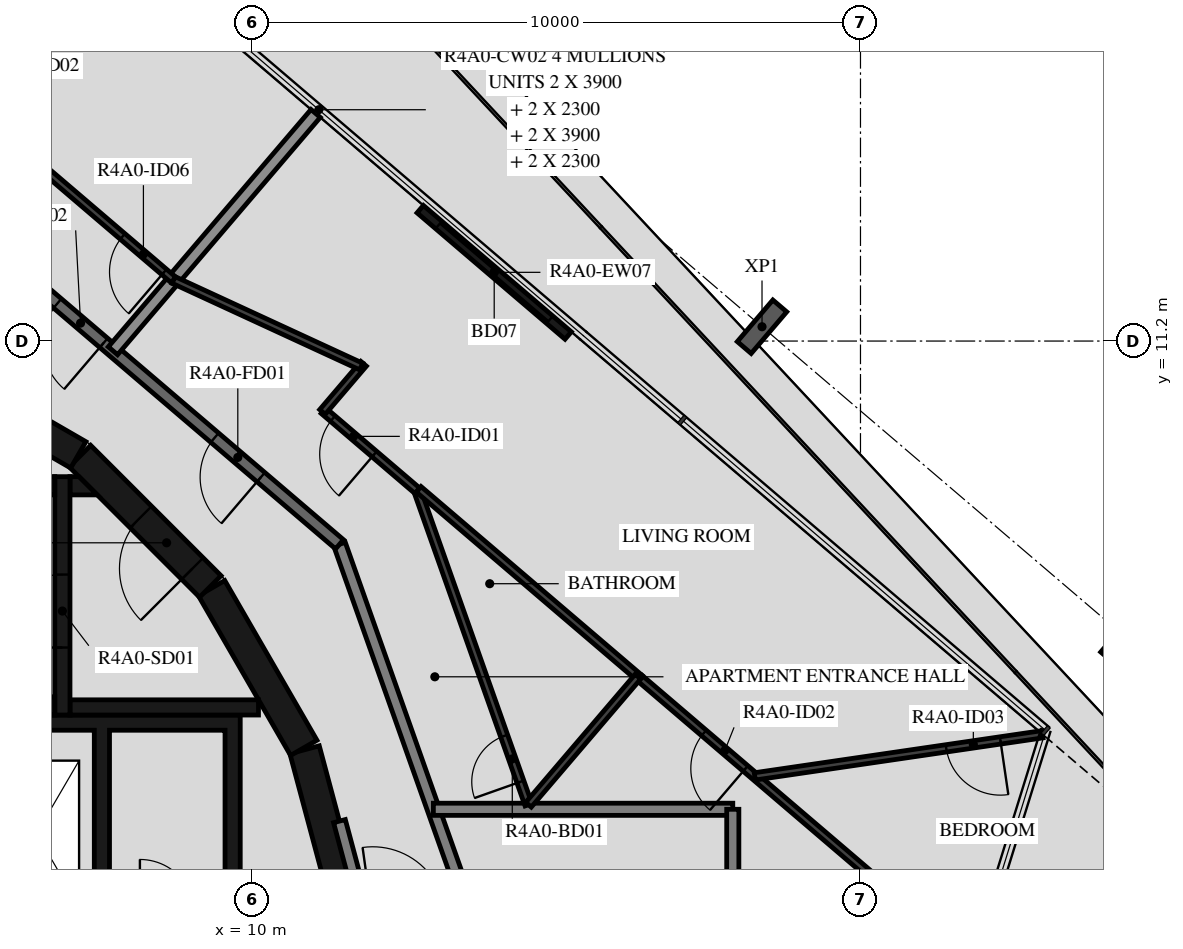
"""IFC4 building model, lengths in metres.
Left out: names, types, materials, properties, quantities, classifications, styles, units other than length and angle.
Written with IfcOpenShell. Run it as: python <this file> out.ifc"""

import sys

from ifc_helpers import new_model, si_unit, direction, frame, frame_2d, origin, origin_2d, place, context, subcontext, project, spatial, polyline, rectangle, i_section, outline, extrude, element, fill, save


model = new_model("IFC4")
c1 = context("Model", 3, precision=1e-05, world=origin(), true_north=direction((0.0, 1.0)))
c2 = subcontext(c1, "Body", "Model", "MODEL_VIEW")
j1 = project(units=[si_unit("LENGTHUNIT", "METRE"), si_unit("PLANEANGLEUNIT", "RADIAN")], contexts=[c1])
p1 = place(None, origin())
s1 = spatial("IfcSite", under=j1, at=p1, CompositionType="ELEMENT")
p2 = place(p1, origin())
s2 = spatial("IfcBuilding", under=s1, at=p2, CompositionType="ELEMENT")
p3 = place(p2, frame((0.0, 0.0, 151.7)))
s3 = spatial("IfcBuildingStorey", under=s2, at=p3, CompositionType="ELEMENT", Elevation=151.7)
for number, where, z_axis, x_axis in (
    (1, (24.358, 6.331, -0.45), (0.0, 0.0, 1.0), (0.76, -0.649, 0.0)),
    (2, (18.381, 11.436, -0.45), (0.0, 0.0, 1.0), (0.76, -0.649, 0.0)),
):
    element("IfcColumn", number, at=place(p3, frame(where, z_axis=z_axis, x_axis=x_axis)), inside=s3, PredefinedType="COLUMN", context=c2, shape_type="SweptSolid", body=[
        extrude(i_section(OverallWidth=0.3, OverallDepth=0.9, WebThickness=0.019, FlangeThickness=0.035, FilletRadius=0.03, at=origin_2d()), origin(), (0.0, 0.0, 1.0), 3.57),
    ])
p4 = place(p3, frame((15.193, 11.291, 0.0), z_axis=(0.0, 0.0, 1.0), x_axis=(-0.760391731187, 0.649464714317, 0.0)))
e3 = element("IfcWall", 3, at=p4, inside=s3, PredefinedType="STANDARD", context=c2, shape_type="SweptSolid", body=[
    extrude(rectangle(XDim=3.2, YDim=0.16, at=frame_2d((1.6, 0.0))), origin(), (0.0, 0.0, 1.0), 3.12),
])
p5 = place(p4, frame((0.4, 0.0, 0.0)))
e4 = element("IfcOpeningElement", 4, at=p5, cuts=e3, PredefinedType="OPENING", context=c2, shape_type="SweptSolid", body=[
    extrude(rectangle(XDim=2.4, YDim=2.4, at=frame_2d((1.2, 1.2))), frame((0.0, 0.09, 0.0), z_axis=(0.0, -1.0, 0.0), x_axis=(1.0, 0.0, 0.0)), (0.0, 0.0, 1.0), 0.18),
])
for number, where, z_axis, x_axis in (
    (5, (11.643, 1.55, 0.0), (0.0, 0.0, 1.0), (-0.259, 0.966, 0.0)),
    (6, (10.845, 4.51, 0.0), (0.0, 0.0, 1.0), (-0.5, 0.866, 0.0)),
):
    element("IfcWall", number, at=place(p3, frame(where, z_axis=z_axis, x_axis=x_axis)), inside=s3, PredefinedType="SHEAR", context=c2, shape_type="SweptSolid", body=[
        extrude(rectangle(XDim=3.033, YDim=0.5, at=frame_2d((1.516, 0.0))), origin(), (0.0, 0.0, 1.0), 3.12),
    ])
p6 = place(p3, frame((9.308, 7.164, 0.0), z_axis=(0.0, 0.0, 1.0), x_axis=(-0.707106781187, 0.707106781187, 0.0)))
e7 = element("IfcWall", 7, at=p6, inside=s3, PredefinedType="SHEAR", context=c2, shape_type="SweptSolid", body=[
    extrude(rectangle(XDim=3.032, YDim=0.5, at=frame_2d((1.516, 0.0))), origin(), (0.0, 0.0, 1.0), 3.12),
])
p7 = place(p6, frame((0.416, 0.0, 0.0)))
e8 = element("IfcOpeningElement", 8, at=p7, cuts=e7, PredefinedType="OPENING", context=c2, shape_type="SweptSolid", body=[
    extrude(rectangle(XDim=1.2, YDim=2.1, at=frame_2d((0.6, 1.05))), frame((0.0, 0.26, 0.0), z_axis=(0.0, -1.0, 0.0), x_axis=(1.0, 0.0, 0.0)), (0.0, 0.0, 1.0), 0.52),
])
p8 = place(p3, frame((7.137, 9.329, 0.0), z_axis=(0.0, 0.0, 1.0), x_axis=(-0.865975092491, 0.500087131594, 0.0)))
e9 = element("IfcWall", 9, at=p8, inside=s3, PredefinedType="SHEAR", context=c2, shape_type="SweptSolid", body=[
    extrude(rectangle(XDim=3.033, YDim=0.5, at=frame_2d((1.516, 0.0))), origin(), (0.0, 0.0, 1.0), 3.12),
])
for number, where, z_axis, x_axis in (
    (10, (0.0, 5.2, 0.0), (0.0, 0.0, 1.0), (1.0, 0.0, 0.0)),
    (11, (0.0, 8.82, 0.0), (0.0, 0.0, 1.0), (1.0, 0.0, 0.0)),
):
    element("IfcWall", number, at=place(p3, frame(where, z_axis=z_axis, x_axis=x_axis)), inside=s3, PredefinedType="SHEAR", context=c2, shape_type="SweptSolid", body=[
        extrude(rectangle(XDim=6.75, YDim=0.3, at=frame_2d((3.375, 0.0))), origin(), (0.0, 0.0, 1.0), 3.12),
    ])
p9 = place(p3, frame((6.875, 5.05, 0.0), z_axis=(0.0, 0.0, 1.0), x_axis=(0.0, 1.0, 0.0)))
e12 = element("IfcWall", 12, at=p9, inside=s3, PredefinedType="SHEAR", context=c2, shape_type="SweptSolid", body=[
    extrude(rectangle(XDim=3.92, YDim=0.25, at=frame_2d((1.96, 0.0))), origin(), (0.0, 0.0, 1.0), 3.12),
])
p10 = place(p9, frame((1.11, 0.0, 0.0)))
e13 = element("IfcOpeningElement", 13, at=p10, cuts=e12, PredefinedType="OPENING", context=c2, shape_type="SweptSolid", body=[
    extrude(rectangle(XDim=1.2, YDim=2.1, at=frame_2d((0.6, 1.05))), frame((0.0, 0.135, 0.0), z_axis=(0.0, -1.0, 0.0), x_axis=(1.0, 0.0, 0.0)), (0.0, 0.0, 1.0), 0.27),
])
p11 = place(p3, frame((7.0, 5.175, 0.0), z_axis=(0.0, 0.0, 1.0), x_axis=(1.0, 0.0, 0.0)))
e14 = element("IfcWall", 14, at=p11, inside=s3, PredefinedType="SHEAR", context=c2, shape_type="SweptSolid", body=[
    extrude(rectangle(XDim=3.1, YDim=0.25, at=frame_2d((1.55, 0.0))), origin(), (0.0, 0.0, 1.0), 3.12),
])
p12 = place(p3, origin())
e15 = element("IfcWall", 15, at=p12, inside=s3, PredefinedType="SHEAR", context=c2, shape_type="SweptSolid", body=[
    extrude(outline(polyline([(7.448, 8.67), (7.0, 8.67), (7.0, 8.97), (7.148, 8.97), (7.448, 8.67)])), origin(), (0.0, 0.0, 1.0), 3.12),
])
p13 = place(p3, origin())
e16 = element("IfcWall", 16, at=p13, inside=s3, PredefinedType="SHEAR", context=c2, shape_type="SweptSolid", body=[
    extrude(outline(polyline([(-9.55, 4.8), (-1.2, 4.8), (-1.2, 1.9), (-0.95, 1.9), (-0.95, 4.8), (0.95, 4.8), (0.95, 1.9), (1.2, 1.9), (1.2, 4.8), (3.1, 4.8), (3.1, 1.9), (3.35, 1.9), (3.35, 4.8), (5.25, 4.8), (5.25, 1.9), (5.5, 1.9), (5.5, 4.8), (7.4, 4.8), (7.4, 1.9), (7.65, 1.9), (7.65, 4.8), (9.55, 4.8), (9.55, 1.9), (9.8, 1.9), (9.8, 4.8), (9.8, 5.05), (-9.8, 5.05), (-9.8, 4.8), (-9.8, 1.9), (-9.55, 1.9), (-9.55, 4.8)])), origin(), (0.0, 0.0, 1.0), 3.12),
])
p14 = place(p3, frame((11.87, 1.668, 0.0), z_axis=(0.0, 0.0, 1.0), x_axis=(-0.258836880648, 0.965921047093, 0.0)))
e17 = element("IfcWall", 17, at=p14, inside=s3, PredefinedType="STANDARD", context=c2, shape_type="SweptSolid", body=[
    extrude(rectangle(XDim=1.695, YDim=0.2, at=frame_2d((0.848, 0.0))), origin(), (0.0, 0.0, 1.0), 3.12),
])
p15 = place(p3, frame((13.542, 1.903, 0.0), z_axis=(0.0, 0.0, 1.0), x_axis=(-0.333808508206, 0.942640907159, 0.0)))
e18 = element("IfcWall", 18, at=p15, inside=s3, PredefinedType="STANDARD", context=c2, shape_type="SweptSolid", body=[
    extrude(rectangle(XDim=6.317, YDim=0.2, at=frame_2d((3.158, 0.0))), origin(), (0.0, 0.0, 1.0), 3.12),
])
p16 = place(p3, frame((11.433, 7.858, 0.0), z_axis=(0.0, 0.0, 1.0), x_axis=(-0.760412154545, 0.649440801937, 0.0)))
e19 = element("IfcWall", 19, at=p16, inside=s3, PredefinedType="STANDARD", context=c2, shape_type="SweptSolid", body=[
    extrude(rectangle(XDim=7.181, YDim=0.2, at=frame_2d((3.59, 0.0))), origin(), (0.0, 0.0, 1.0), 3.12),
])
p17 = place(p16, frame((1.7, 0.0, 0.0)))
e20 = element("IfcOpeningElement", 20, at=p17, cuts=e19, PredefinedType="OPENING", context=c2, shape_type="SweptSolid", body=[
    extrude(rectangle(XDim=1.0, YDim=2.1, at=frame_2d((0.5, 1.05))), frame((0.0, 0.11, 0.0), z_axis=(0.0, -1.0, 0.0), x_axis=(1.0, 0.0, 0.0)), (0.0, 0.0, 1.0), 0.22),
])
p18 = place(p16, frame((5.101, 0.0, 0.0)))
e21 = element("IfcOpeningElement", 21, at=p18, cuts=e19, PredefinedType="OPENING", context=c2, shape_type="SweptSolid", body=[
    extrude(rectangle(XDim=1.0, YDim=2.1, at=frame_2d((0.5, 1.05))), frame((0.0, 0.11, 0.0), z_axis=(0.0, -1.0, 0.0), x_axis=(1.0, 0.0, 0.0)), (0.0, 0.0, 1.0), 0.22),
])
p19 = place(p3, frame((17.9, 3.5, 0.0), z_axis=(0.0, 0.0, 1.0), x_axis=(-1.0, 0.0, 0.0)))
e22 = element("IfcWall", 22, at=p19, inside=s3, PredefinedType="STANDARD", context=c2, shape_type="SweptSolid", body=[
    extrude(rectangle(XDim=4.924, YDim=0.2, at=frame_2d((2.462, 0.0))), origin(), (0.0, 0.0, 1.0), 3.12),
])
p20 = place(p3, frame((17.9, -3.318, 0.0), z_axis=(0.0, 0.0, 1.0), x_axis=(0.0, 1.0, 0.0)))
e23 = element("IfcWall", 23, at=p20, inside=s3, PredefinedType="STANDARD", context=c2, shape_type="SweptSolid", body=[
    extrude(rectangle(XDim=6.818, YDim=0.2, at=frame_2d((3.409, 0.0))), origin(), (0.0, 0.0, 1.0), 3.12),
])
p21 = place(p3, frame((11.04, 14.943, 0.0), z_axis=(0.0, 0.0, 1.0), x_axis=(-0.649442880087, -0.760410379666, 0.0)))
e24 = element("IfcWall", 24, at=p21, inside=s3, PredefinedType="STANDARD", context=c2, shape_type="SweptSolid", body=[
    extrude(rectangle(XDim=5.133, YDim=0.2, at=frame_2d((2.566, 0.0))), origin(), (0.0, 0.0, 1.0), 2.73),
])
p22 = place(p3, frame((14.541, 3.575, 0.0), z_axis=(0.0, 0.0, 1.0), x_axis=(-0.333799280318, 0.942644174893, 0.0)))
e25 = element("IfcWall", 25, at=p22, inside=s3, PredefinedType="PARTITIONING", context=c2, shape_type="SweptSolid", body=[
    extrude(rectangle(XDim=5.477, YDim=0.12, at=frame_2d((2.738, 0.0))), origin(), (0.0, 0.0, 1.0), 3.12),
])
p23 = place(p22, frame((0.4, 0.0, 0.0)))
e26 = element("IfcOpeningElement", 26, at=p23, cuts=e25, PredefinedType="OPENING", context=c2, shape_type="SweptSolid", body=[
    extrude(rectangle(XDim=0.8, YDim=2.1, at=frame_2d((0.4, 1.05))), frame((0.0, 0.07, 0.0), z_axis=(0.0, -1.0, 0.0), x_axis=(1.0, 0.0, 0.0)), (0.0, 0.0, 1.0), 0.14),
])
p24 = place(p3, frame((12.713, 8.737, 0.0), z_axis=(0.0, 0.0, 1.0), x_axis=(-0.760410825807, 0.649442357716, 0.0)))
e27 = element("IfcWall", 27, at=p24, inside=s3, PredefinedType="PARTITIONING", context=c2, shape_type="SweptSolid", body=[
    extrude(rectangle(XDim=2.029, YDim=0.12, at=frame_2d((1.014, 0.0))), origin(), (0.0, 0.0, 1.0), 3.12),
])
p25 = place(p24, frame((0.929, 0.0, 0.0)))
e28 = element("IfcOpeningElement", 28, at=p25, cuts=e27, PredefinedType="OPENING", context=c2, shape_type="SweptSolid", body=[
    extrude(rectangle(XDim=0.9, YDim=2.1, at=frame_2d((0.45, 1.05))), frame((0.0, 0.07, 0.0), z_axis=(0.0, -1.0, 0.0), x_axis=(1.0, 0.0, 0.0)), (0.0, 0.0, 1.0), 0.14),
])
p26 = place(p3, frame((12.734, 8.762, 0.0), z_axis=(0.0, 0.0, 1.0), x_axis=(0.760390484255, -0.649466174219, 0.0)))
e29 = element("IfcWall", 29, at=p26, inside=s3, PredefinedType="PARTITIONING", context=c2, shape_type="SweptSolid", body=[
    extrude(rectangle(XDim=4.783, YDim=0.12, at=frame_2d((2.391, 0.0))), origin(), (0.0, 0.0, 1.0), 3.12),
])
p27 = place(p3, frame((11.153, 10.034, 0.0), z_axis=(0.0, 0.0, 1.0), x_axis=(0.649381401329, 0.760462882466, 0.0)))
e30 = element("IfcWall", 30, at=p27, inside=s3, PredefinedType="PARTITIONING", context=c2, shape_type="SweptSolid", body=[
    extrude(rectangle(XDim=1.042, YDim=0.12, at=frame_2d((0.521, 0.0))), origin(), (0.0, 0.0, 1.0), 3.12),
])
p28 = place(p3, frame((11.79, 10.781, 0.0), z_axis=(0.0, 0.0, 1.0), x_axis=(-0.907999296286, 0.418971691101, 0.0)))
e31 = element("IfcWall", 31, at=p28, inside=s3, PredefinedType="PARTITIONING", context=c2, shape_type="SweptSolid", body=[
    extrude(rectangle(XDim=3.401, YDim=0.12, at=frame_2d((1.701, 0.0))), origin(), (0.0, 0.0, 1.0), 3.12),
])
p29 = place(p3, frame((23.411, -0.357, 0.0), z_axis=(0.0, 0.0, 1.0), x_axis=(-0.76041871148, 0.649433124525, 0.0)))
e32 = element("IfcWall", 32, at=p29, inside=s3, PredefinedType="PARTITIONING", context=c2, shape_type="SweptSolid", body=[
    extrude(rectangle(XDim=9.259, YDim=0.12, at=frame_2d((4.629, 0.0))), origin(), (0.0, 0.0, 1.0), 3.12),
])
p30 = place(p29, frame((6.972, 0.0, 0.0)))
e33 = element("IfcOpeningElement", 33, at=p30, cuts=e32, PredefinedType="OPENING", context=c2, shape_type="SweptSolid", body=[
    extrude(rectangle(XDim=0.9, YDim=2.1, at=frame_2d((0.45, 1.05))), frame((0.0, 0.07, 0.0), z_axis=(0.0, -1.0, 0.0), x_axis=(1.0, 0.0, 0.0)), (0.0, 0.0, 1.0), 0.14),
])
p31 = place(p29, frame((0.2, 0.0, 0.0)))
e34 = element("IfcOpeningElement", 34, at=p31, cuts=e32, PredefinedType="OPENING", context=c2, shape_type="SweptSolid", body=[
    extrude(rectangle(XDim=0.9, YDim=2.1, at=frame_2d((0.45, 1.05))), frame((0.0, 0.07, 0.0), z_axis=(0.0, -1.0, 0.0), x_axis=(1.0, 0.0, 0.0)), (0.0, 0.0, 1.0), 0.14),
])
p32 = place(p3, frame((16.341, 5.682, 0.0), z_axis=(0.0, 0.0, 1.0), x_axis=(-0.64946993237, -0.76038727432, 0.0)))
e35 = element("IfcWall", 35, at=p32, inside=s3, PredefinedType="PARTITIONING", context=c2, shape_type="SweptSolid", body=[
    extrude(rectangle(XDim=2.771, YDim=0.12, at=frame_2d((1.386, 0.0))), origin(), (0.0, 0.0, 1.0), 3.12),
])
p33 = place(p3, frame((22.994, 4.734, 0.0), z_axis=(0.0, 0.0, 1.0), x_axis=(-0.989449286977, -0.144879634529, 0.0)))
e36 = element("IfcWall", 36, at=p33, inside=s3, PredefinedType="PARTITIONING", context=c2, shape_type="SweptSolid", body=[
    extrude(rectangle(XDim=4.782, YDim=0.12, at=frame_2d((2.391, 0.0))), origin(), (0.0, 0.0, 1.0), 3.12),
])
p34 = place(p33, frame((0.7, 0.0, 0.0)))
e37 = element("IfcOpeningElement", 37, at=p34, cuts=e36, PredefinedType="OPENING", context=c2, shape_type="SweptSolid", body=[
    extrude(rectangle(XDim=0.9, YDim=2.1, at=frame_2d((0.45, 1.05))), frame((0.0, 0.07, 0.0), z_axis=(0.0, -1.0, 0.0), x_axis=(1.0, 0.0, 0.0)), (0.0, 0.0, 1.0), 0.14),
])
p35 = place(p3, frame((8.702, 12.206, 0.0), z_axis=(0.0, 0.0, 1.0), x_axis=(-0.760401313718, 0.649453494945, 0.0)))
e38 = element("IfcWall", 38, at=p35, inside=s3, PredefinedType="PARTITIONING", context=c2, shape_type="SweptSolid", body=[
    extrude(rectangle(XDim=16.724, YDim=0.12, at=frame_2d((8.362, 0.0))), origin(), (0.0, 0.0, 1.0), 3.12),
])
p36 = place(p35, frame((0.2, 0.0, 0.0)))
e39 = element("IfcOpeningElement", 39, at=p36, cuts=e38, PredefinedType="OPENING", context=c2, shape_type="SweptSolid", body=[
    extrude(rectangle(XDim=0.9, YDim=2.1, at=frame_2d((0.45, 1.05))), frame((0.0, 0.07, 0.0), z_axis=(0.0, -1.0, 0.0), x_axis=(1.0, 0.0, 0.0)), (0.0, 0.0, 1.0), 0.14),
])
p37 = place(p35, frame((7.099, 0.0, 0.0)))
e40 = element("IfcOpeningElement", 40, at=p37, cuts=e38, PredefinedType="OPENING", context=c2, shape_type="SweptSolid", body=[
    extrude(rectangle(XDim=0.9, YDim=2.1, at=frame_2d((0.45, 1.05))), frame((0.0, 0.07, 0.0), z_axis=(0.0, -1.0, 0.0), x_axis=(1.0, 0.0, 0.0)), (0.0, 0.0, 1.0), 0.14),
])
p38 = place(p5, origin())
e41 = element("IfcDoor", 41, at=p38, inside=s3, OperationType="DOUBLE_DOOR_SLIDING", PredefinedType="DOOR", context=c2, shape_type="SweptSolid", body=[
    extrude(rectangle(XDim=2.4, YDim=2.4, at=frame_2d((1.2, 1.2))), frame((0.0, 0.025, 0.0), z_axis=(0.0, -1.0, 0.0), x_axis=(1.0, 0.0, 0.0)), (0.0, 0.0, 1.0), 0.05),
])
fill(e4, e41)
p39 = place(p10, origin())
e42 = element("IfcDoor", 42, at=p39, inside=s3, OperationType="SINGLE_SWING_LEFT", PredefinedType="DOOR", context=c2, shape_type="SweptSolid", body=[
    extrude(rectangle(XDim=1.2, YDim=2.1, at=frame_2d((0.6, 1.05))), frame((0.0, 0.025, 0.0), z_axis=(0.0, -1.0, 0.0), x_axis=(1.0, 0.0, 0.0)), (0.0, 0.0, 1.0), 0.05),
])
fill(e13, e42)
p40 = place(p7, origin())
e43 = element("IfcDoor", 43, at=p40, inside=s3, OperationType="SINGLE_SWING_RIGHT", PredefinedType="DOOR", context=c2, shape_type="SweptSolid", body=[
    extrude(rectangle(XDim=1.2, YDim=2.1, at=frame_2d((0.6, 1.05))), frame((0.0, 0.025, 0.0), z_axis=(0.0, -1.0, 0.0), x_axis=(1.0, 0.0, 0.0)), (0.0, 0.0, 1.0), 0.05),
])
fill(e8, e43)
p41 = place(p17, origin())
e44 = element("IfcDoor", 44, at=p41, inside=s3, OperationType="SINGLE_SWING_LEFT", PredefinedType="DOOR", context=c2, shape_type="SweptSolid", body=[
    extrude(rectangle(XDim=1.0, YDim=2.1, at=frame_2d((0.5, 1.05))), frame((0.0, 0.025, 0.0), z_axis=(0.0, -1.0, 0.0), x_axis=(1.0, 0.0, 0.0)), (0.0, 0.0, 1.0), 0.05),
])
fill(e20, e44)
p42 = place(p23, origin())
e45 = element("IfcDoor", 45, at=p42, inside=s3, OperationType="SINGLE_SWING_LEFT", PredefinedType="DOOR", context=c2, shape_type="SweptSolid", body=[
    extrude(rectangle(XDim=0.8, YDim=2.1, at=frame_2d((0.4, 1.05))), frame((0.0, 0.025, 0.0), z_axis=(0.0, -1.0, 0.0), x_axis=(1.0, 0.0, 0.0)), (0.0, 0.0, 1.0), 0.05),
])
fill(e26, e45)
p43 = place(p25, origin())
e46 = element("IfcDoor", 46, at=p43, inside=s3, OperationType="SINGLE_SWING_LEFT", PredefinedType="DOOR", context=c2, shape_type="SweptSolid", body=[
    extrude(rectangle(XDim=0.9, YDim=2.1, at=frame_2d((0.45, 1.05))), frame((0.0, 0.025, 0.0), z_axis=(0.0, -1.0, 0.0), x_axis=(1.0, 0.0, 0.0)), (0.0, 0.0, 1.0), 0.05),
])
fill(e28, e46)
p44 = place(p30, origin())
e47 = element("IfcDoor", 47, at=p44, inside=s3, OperationType="SINGLE_SWING_RIGHT", PredefinedType="DOOR", context=c2, shape_type="SweptSolid", body=[
    extrude(rectangle(XDim=0.9, YDim=2.1, at=frame_2d((0.45, 1.05))), frame((0.0, 0.025, 0.0), z_axis=(0.0, -1.0, 0.0), x_axis=(1.0, 0.0, 0.0)), (0.0, 0.0, 1.0), 0.05),
])
fill(e33, e47)
p45 = place(p34, origin())
e48 = element("IfcDoor", 48, at=p45, inside=s3, OperationType="SINGLE_SWING_LEFT", PredefinedType="DOOR", context=c2, shape_type="SweptSolid", body=[
    extrude(rectangle(XDim=0.9, YDim=2.1, at=frame_2d((0.45, 1.05))), frame((0.0, 0.025, 0.0), z_axis=(0.0, -1.0, 0.0), x_axis=(1.0, 0.0, 0.0)), (0.0, 0.0, 1.0), 0.05),
])
fill(e37, e48)
p46 = place(p18, origin())
e49 = element("IfcDoor", 49, at=p46, inside=s3, OperationType="SINGLE_SWING_RIGHT", PredefinedType="DOOR", context=c2, shape_type="SweptSolid", body=[
    extrude(rectangle(XDim=1.0, YDim=2.1, at=frame_2d((0.5, 1.05))), frame((0.0, 0.025, 0.0), z_axis=(0.0, -1.0, 0.0), x_axis=(1.0, 0.0, 0.0)), (0.0, 0.0, 1.0), 0.05),
])
fill(e21, e49)
p47 = place(p36, origin())
e50 = element("IfcDoor", 50, at=p47, inside=s3, OperationType="SINGLE_SWING_RIGHT", PredefinedType="DOOR", context=c2, shape_type="SweptSolid", body=[
    extrude(rectangle(XDim=0.9, YDim=2.1, at=frame_2d((0.45, 1.05))), frame((0.0, 0.025, 0.0), z_axis=(0.0, -1.0, 0.0), x_axis=(1.0, 0.0, 0.0)), (0.0, 0.0, 1.0), 0.05),
])
fill(e39, e50)
save(model, sys.argv[1])
